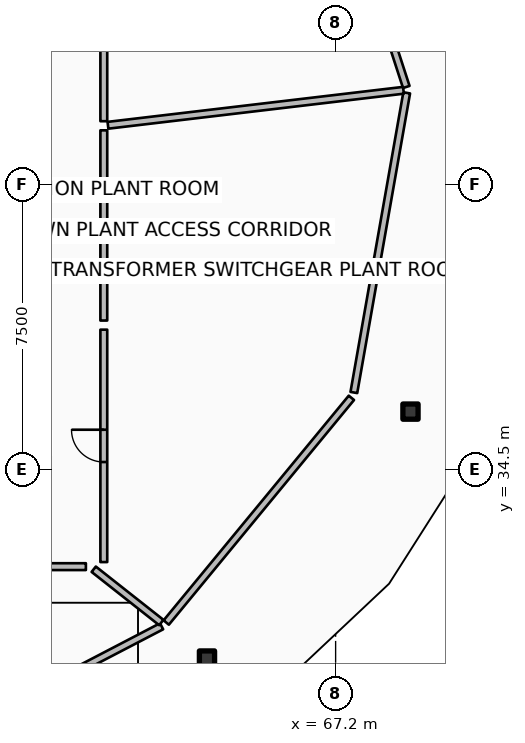
"""IFC4 building model, lengths in metres.
Left out: names, types, materials, properties, quantities, classifications, styles, units other than length and angle.
Written with IfcOpenShell. Run it as: python <this file> out.ifc"""

import sys

from ifc_helpers import new_model, si_unit, direction, frame, frame_2d, origin, origin_2d, place, context, subcontext, project, spatial, rectangle, hollow_rectangle, extrude, element, fill, save


model = new_model("IFC4")
c1 = context("Model", 3, precision=1e-05, world=origin(), true_north=direction((0.0, 1.0)))
c2 = subcontext(c1, "Body", "Model", "MODEL_VIEW")
j1 = project(units=[si_unit("LENGTHUNIT", "METRE"), si_unit("PLANEANGLEUNIT", "RADIAN")], contexts=[c1])
p1 = place(None, origin())
s1 = spatial("IfcSite", under=j1, at=p1, CompositionType="ELEMENT")
p2 = place(p1, origin())
s2 = spatial("IfcBuilding", under=s1, at=p2, CompositionType="ELEMENT")
p3 = place(p2, frame((0.0, 0.0, 363.2)))
s3 = spatial("IfcBuildingStorey", under=s2, at=p3, CompositionType="ELEMENT", Elevation=363.2)
for number, where, z_axis, x_axis in (
    (1, (63.815, 29.532, 0.0), (0.0, 0.0, 1.0), (1.0, 0.0, 0.0)),
    (2, (69.17, 36.03, 0.0), (0.0, 0.0, 1.0), (1.0, 0.0, 0.0)),
):
    element("IfcColumn", number, at=place(p3, frame(where, z_axis=z_axis, x_axis=x_axis)), inside=s3, PredefinedType="COLUMN", context=c2, shape_type="SweptSolid", body=[
        extrude(hollow_rectangle(XDim=0.4, YDim=0.4, WallThickness=0.02, InnerFilletRadius=0.02, OuterFilletRadius=0.04, at=origin_2d()), origin(), (0.0, 0.0, 1.0), 3.32),
    ])
p4 = place(p3, frame((56.41, 27.147, 0.0), z_axis=(0.0, 0.0, 1.0), x_axis=(0.886949494865, 0.461866423935, 0.0)))
e3 = element("IfcWall", 3, at=p4, inside=s3, PredefinedType="PARTITIONING", context=c2, shape_type="SweptSolid", body=[
    extrude(rectangle(XDim=7.002, YDim=0.18, at=frame_2d((3.501, 0.0))), origin(), (0.0, 0.0, 1.0), 2.76),
])
p5 = place(p3, frame((62.742, 30.48, 0.0), z_axis=(0.0, 0.0, 1.0), x_axis=(0.636018833443, 0.771673534278, 0.0)))
e4 = element("IfcWall", 4, at=p5, inside=s3, PredefinedType="PARTITIONING", context=c2, shape_type="SweptSolid", body=[
    extrude(rectangle(XDim=7.661, YDim=0.18, at=frame_2d((3.831, 0.0))), origin(), (0.0, 0.0, 1.0), 2.76),
])
p6 = place(p3, frame((67.68, 36.532, 0.0), z_axis=(0.0, 0.0, 1.0), x_axis=(0.173668776466, 0.984804120666, 0.0)))
e5 = element("IfcWall", 5, at=p6, inside=s3, PredefinedType="PARTITIONING", context=c2, shape_type="SweptSolid", body=[
    extrude(rectangle(XDim=8.006, YDim=0.18, at=frame_2d((4.003, 0.0))), origin(), (0.0, 0.0, 1.0), 2.76),
])
p7 = place(p3, frame((69.059, 44.572, 0.0), z_axis=(0.0, 0.0, 1.0), x_axis=(-0.309024234991, 0.951054163646, 0.0)))
e6 = element("IfcWall", 6, at=p7, inside=s3, PredefinedType="PARTITIONING", context=c2, shape_type="SweptSolid", body=[
    extrude(rectangle(XDim=8.124, YDim=0.18, at=frame_2d((4.062, 0.0))), origin(), (0.0, 0.0, 1.0), 2.76),
])
p8 = place(p3, frame((53.748, 31.95, 0.0), z_axis=(0.0, 0.0, 1.0), x_axis=(1.0, 0.0, 0.0)))
e7 = element("IfcWall", 7, at=p8, inside=s3, PredefinedType="PARTITIONING", context=c2, shape_type="SweptSolid", body=[
    extrude(rectangle(XDim=6.88, YDim=0.18, at=frame_2d((3.44, 0.0))), origin(), (0.0, 0.0, 1.0), 2.76),
])
p9 = place(p8, frame((3.015, 0.0, 0.0)))
e8 = element("IfcOpeningElement", 8, at=p9, cuts=e7, PredefinedType="OPENING", context=c2, shape_type="SweptSolid", body=[
    extrude(rectangle(XDim=0.85, YDim=2.06, at=frame_2d((0.425, 1.03))), frame((0.0, 0.1, 0.0), z_axis=(0.0, -1.0, 0.0), x_axis=(1.0, 0.0, 0.0)), (0.0, 0.0, 1.0), 0.2),
])
p10 = place(p3, frame((60.835, 31.882, 0.0), z_axis=(0.0, 0.0, 1.0), x_axis=(0.785329646864, -0.619077818821, 0.0)))
e9 = element("IfcWall", 9, at=p10, inside=s3, PredefinedType="PARTITIONING", context=c2, shape_type="SweptSolid", body=[
    extrude(rectangle(XDim=2.264, YDim=0.18, at=frame_2d((1.132, 0.0))), origin(), (0.0, 0.0, 1.0), 2.76),
])
p11 = place(p3, frame((61.1, 32.07, 0.0), z_axis=(0.0, 0.0, 1.0), x_axis=(0.0, 1.0, 0.0)))
e10 = element("IfcWall", 10, at=p11, inside=s3, PredefinedType="PARTITIONING", context=c2, shape_type="SweptSolid", body=[
    extrude(rectangle(XDim=6.115, YDim=0.18, at=frame_2d((3.058, 0.0))), origin(), (0.0, 0.0, 1.0), 2.76),
])
p12 = place(p11, frame((2.633, 0.0, 0.0)))
e11 = element("IfcOpeningElement", 11, at=p12, cuts=e10, PredefinedType="OPENING", context=c2, shape_type="SweptSolid", body=[
    extrude(rectangle(XDim=0.85, YDim=2.06, at=frame_2d((0.425, 1.03))), frame((0.0, 0.1, 0.0), z_axis=(0.0, -1.0, 0.0), x_axis=(1.0, 0.0, 0.0)), (0.0, 0.0, 1.0), 0.2),
])
p13 = place(p3, frame((61.1, 38.425, 0.0), z_axis=(0.0, 0.0, 1.0), x_axis=(0.0, 1.0, 0.0)))
e12 = element("IfcWall", 12, at=p13, inside=s3, PredefinedType="PARTITIONING", context=c2, shape_type="SweptSolid", body=[
    extrude(rectangle(XDim=5.005, YDim=0.18, at=frame_2d((2.502, 0.0))), origin(), (0.0, 0.0, 1.0), 2.76),
])
p14 = place(p3, frame((61.209, 43.563, 0.0), z_axis=(0.0, 0.0, 1.0), x_axis=(0.993070558818, 0.117519637545, 0.0)))
e13 = element("IfcWall", 13, at=p14, inside=s3, PredefinedType="PARTITIONING", context=c2, shape_type="SweptSolid", body=[
    extrude(rectangle(XDim=7.83, YDim=0.18, at=frame_2d((3.915, 0.0))), origin(), (0.0, 0.0, 1.0), 2.76),
])
p15 = place(p3, frame((61.1, 43.67, 0.0), z_axis=(0.0, 0.0, 1.0), x_axis=(0.0, 1.0, 0.0)))
e14 = element("IfcWall", 14, at=p15, inside=s3, PredefinedType="PARTITIONING", context=c2, shape_type="SweptSolid", body=[
    extrude(rectangle(XDim=5.546, YDim=0.18, at=frame_2d((2.773, 0.0))), origin(), (0.0, 0.0, 1.0), 2.76),
])
p16 = place(p15, frame((2.348, 0.0, 0.0)))
e15 = element("IfcOpeningElement", 15, at=p16, cuts=e14, PredefinedType="OPENING", context=c2, shape_type="SweptSolid", body=[
    extrude(rectangle(XDim=0.85, YDim=2.06, at=frame_2d((0.425, 1.03))), frame((0.0, 0.1, 0.0), z_axis=(0.0, -1.0, 0.0), x_axis=(1.0, 0.0, 0.0)), (0.0, 0.0, 1.0), 0.2),
])
p17 = place(p12, origin())
e16 = element("IfcDoor", 16, at=p17, inside=s3, OperationType="SINGLE_SWING_RIGHT", PredefinedType="DOOR", context=c2, shape_type="SweptSolid", body=[
    extrude(rectangle(XDim=0.85, YDim=2.06, at=frame_2d((0.425, 1.03))), frame((0.0, 0.025, 0.0), z_axis=(0.0, -1.0, 0.0), x_axis=(1.0, 0.0, 0.0)), (0.0, 0.0, 1.0), 0.05),
])
fill(e11, e16)
save(model, sys.argv[1])
